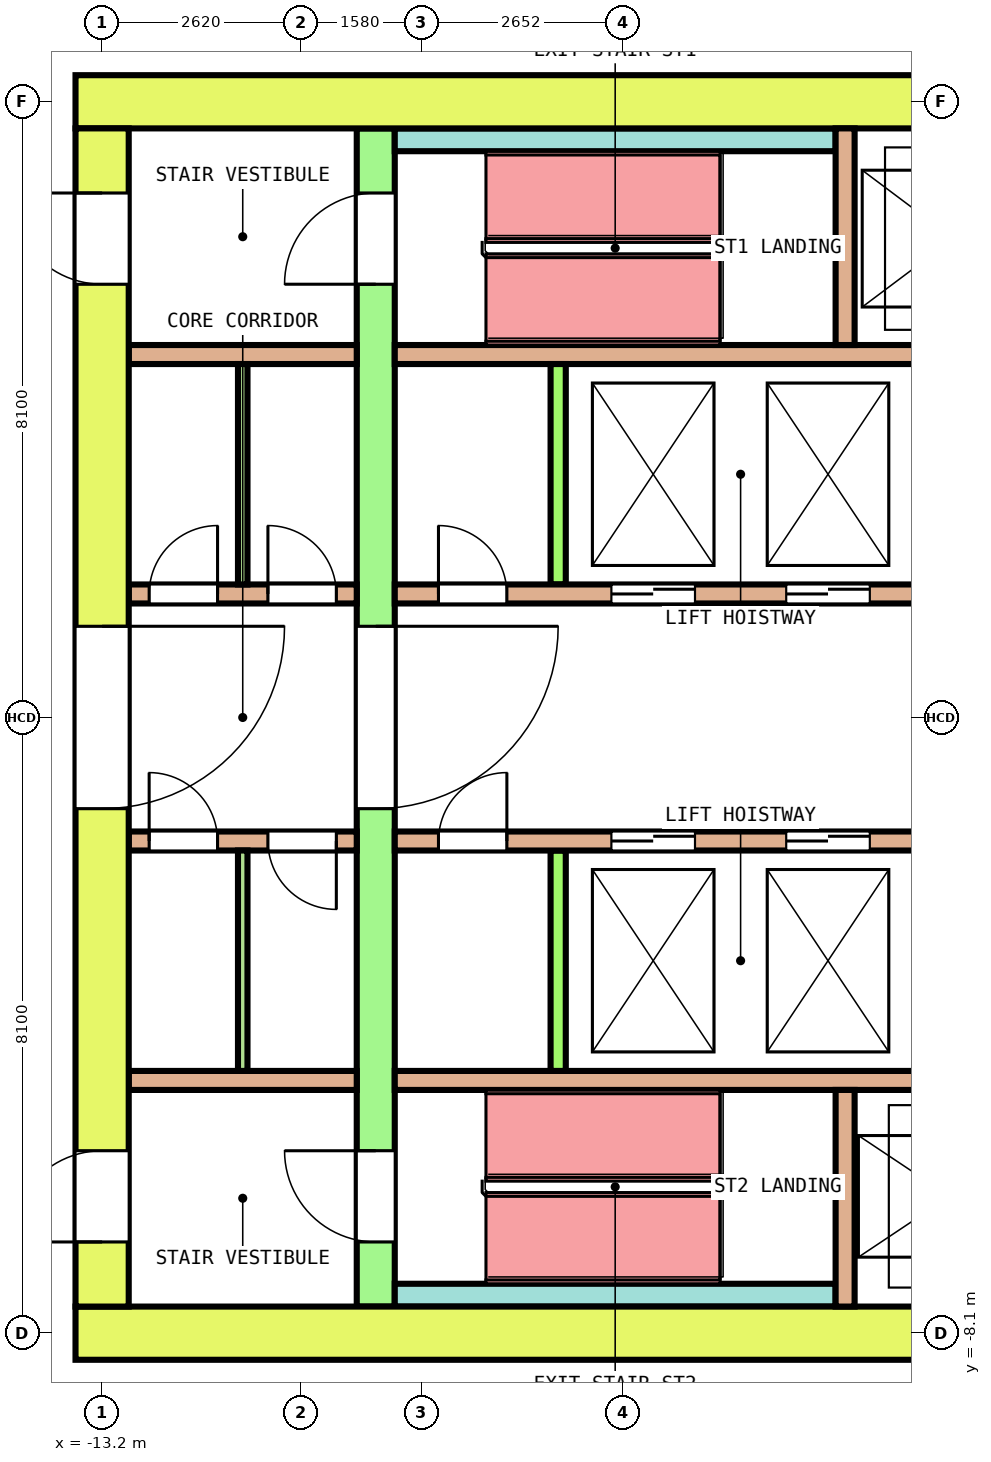
"""IFC4 building model, lengths in metres.
Left out: names, types, materials, properties, quantities, classifications, styles, units other than length and angle.
Written with IfcOpenShell. Run it as: python <this file> out.ifc"""

import sys

from ifc_helpers import new_model, si_unit, direction, frame, frame_2d, origin, place, context, subcontext, project, spatial, rectangle, extrude, element, fill, save


model = new_model("IFC4")
c1 = context("Model", 3, precision=1e-05, world=origin(), true_north=direction((0.0, 1.0)))
c2 = subcontext(c1, "Body", "Model", "MODEL_VIEW")
j1 = project(units=[si_unit("LENGTHUNIT", "METRE"), si_unit("PLANEANGLEUNIT", "RADIAN")], contexts=[c1])
p1 = place(None, origin())
s1 = spatial("IfcSite", under=j1, at=p1, CompositionType="ELEMENT")
p2 = place(p1, origin())
s2 = spatial("IfcBuilding", under=s1, at=p2, CompositionType="ELEMENT")
p3 = place(p2, frame((0.0, 0.0, 154.0)))
s3 = spatial("IfcBuildingStorey", under=s2, at=p3, CompositionType="ELEMENT", Elevation=154.0)
p4 = place(p3, frame((-13.55, 8.1, 0.0), z_axis=(0.0, 0.0, 1.0), x_axis=(1.0, 0.0, 0.0)))
e1 = element("IfcWall", 1, at=p4, inside=s3, PredefinedType="SHEAR", context=c2, shape_type="SweptSolid", body=[
    extrude(rectangle(XDim=27.1, YDim=0.7, at=frame_2d((13.55, 0.0))), origin(), (0.0, 0.0, 1.0), 4.1),
])
p5 = place(p4, frame((14.475, 0.0, 0.0)))
e2 = element("IfcOpeningElement", 2, at=p5, cuts=e1, PredefinedType="OPENING", context=c2, shape_type="SweptSolid", body=[
    extrude(rectangle(XDim=1.4, YDim=2.1, at=frame_2d((0.7, 1.05))), frame((0.0, 0.36, 0.0), z_axis=(0.0, -1.0, 0.0), x_axis=(1.0, 0.0, 0.0)), (0.0, 0.0, 1.0), 0.72),
])
p6 = place(p3, frame((-13.55, -8.1, 0.0), z_axis=(0.0, 0.0, 1.0), x_axis=(1.0, 0.0, 0.0)))
e3 = element("IfcWall", 3, at=p6, inside=s3, PredefinedType="SHEAR", context=c2, shape_type="SweptSolid", body=[
    extrude(rectangle(XDim=27.1, YDim=0.7, at=frame_2d((13.55, 0.0))), origin(), (0.0, 0.0, 1.0), 4.1),
])
p7 = place(p6, frame((15.1, 0.0, 0.0)))
e4 = element("IfcOpeningElement", 4, at=p7, cuts=e3, PredefinedType="OPENING", context=c2, shape_type="SweptSolid", body=[
    extrude(rectangle(XDim=1.2, YDim=2.1, at=frame_2d((0.6, 1.05))), frame((0.0, 0.36, 0.0), z_axis=(0.0, -1.0, 0.0), x_axis=(1.0, 0.0, 0.0)), (0.0, 0.0, 1.0), 0.72),
])
p8 = place(p3, frame((-13.2, -7.75, 0.0), z_axis=(0.0, 0.0, 1.0), x_axis=(0.0, 1.0, 0.0)))
e5 = element("IfcWall", 5, at=p8, inside=s3, PredefinedType="SHEAR", context=c2, shape_type="SweptSolid", body=[
    extrude(rectangle(XDim=15.5, YDim=0.7, at=frame_2d((7.75, 0.0))), origin(), (0.0, 0.0, 1.0), 4.1),
])
p9 = place(p8, frame((6.55, 0.0, 0.0)))
e6 = element("IfcOpeningElement", 6, at=p9, cuts=e5, PredefinedType="OPENING", context=c2, shape_type="SweptSolid", body=[
    extrude(rectangle(XDim=2.4, YDim=2.1, at=frame_2d((1.2, 1.05))), frame((0.0, 0.36, 0.0), z_axis=(0.0, -1.0, 0.0), x_axis=(1.0, 0.0, 0.0)), (0.0, 0.0, 1.0), 0.72),
])
p10 = place(p8, frame((13.45, 0.0, 0.0)))
e7 = element("IfcOpeningElement", 7, at=p10, cuts=e5, PredefinedType="OPENING", context=c2, shape_type="SweptSolid", body=[
    extrude(rectangle(XDim=1.2, YDim=2.1, at=frame_2d((0.6, 1.05))), frame((0.0, 0.36, 0.0), z_axis=(0.0, -1.0, 0.0), x_axis=(1.0, 0.0, 0.0)), (0.0, 0.0, 1.0), 0.72),
])
p11 = place(p8, frame((0.85, 0.0, 0.0)))
e8 = element("IfcOpeningElement", 8, at=p11, cuts=e5, PredefinedType="OPENING", context=c2, shape_type="SweptSolid", body=[
    extrude(rectangle(XDim=1.2, YDim=2.1, at=frame_2d((0.6, 1.05))), frame((0.0, 0.36, 0.0), z_axis=(0.0, -1.0, 0.0), x_axis=(1.0, 0.0, 0.0)), (0.0, 0.0, 1.0), 0.72),
])
p12 = place(p3, frame((-9.6, -7.75, 0.0), z_axis=(0.0, 0.0, 1.0), x_axis=(0.0, 1.0, 0.0)))
e9 = element("IfcWall", 9, at=p12, inside=s3, PredefinedType="SHEAR", context=c2, shape_type="SweptSolid", body=[
    extrude(rectangle(XDim=15.5, YDim=0.5, at=frame_2d((7.75, 0.0))), origin(), (0.0, 0.0, 1.0), 4.1),
])
p13 = place(p12, frame((6.55, 0.0, 0.0)))
e10 = element("IfcOpeningElement", 10, at=p13, cuts=e9, PredefinedType="OPENING", context=c2, shape_type="SweptSolid", body=[
    extrude(rectangle(XDim=2.4, YDim=2.1, at=frame_2d((1.2, 1.05))), frame((0.0, 0.26, 0.0), z_axis=(0.0, -1.0, 0.0), x_axis=(1.0, 0.0, 0.0)), (0.0, 0.0, 1.0), 0.52),
])
p14 = place(p12, frame((13.45, 0.0, 0.0)))
e11 = element("IfcOpeningElement", 11, at=p14, cuts=e9, PredefinedType="OPENING", context=c2, shape_type="SweptSolid", body=[
    extrude(rectangle(XDim=1.2, YDim=2.1, at=frame_2d((0.6, 1.05))), frame((0.0, 0.26, 0.0), z_axis=(0.0, -1.0, 0.0), x_axis=(1.0, 0.0, 0.0)), (0.0, 0.0, 1.0), 0.52),
])
p15 = place(p12, frame((0.85, 0.0, 0.0)))
e12 = element("IfcOpeningElement", 12, at=p15, cuts=e9, PredefinedType="OPENING", context=c2, shape_type="SweptSolid", body=[
    extrude(rectangle(XDim=1.2, YDim=2.1, at=frame_2d((0.6, 1.05))), frame((0.0, 0.26, 0.0), z_axis=(0.0, -1.0, 0.0), x_axis=(1.0, 0.0, 0.0)), (0.0, 0.0, 1.0), 0.52),
])
p16 = place(p3, frame((-12.85, 1.625, 0.0), z_axis=(0.0, 0.0, 1.0), x_axis=(1.0, 0.0, 0.0)))
e13 = element("IfcWall", 13, at=p16, inside=s3, PredefinedType="SOLIDWALL", context=c2, shape_type="SweptSolid", body=[
    extrude(rectangle(XDim=3.0, YDim=0.25, at=frame_2d((1.5, 0.0))), origin(), (0.0, 0.0, 1.0), 4.1),
])
p17 = place(p16, frame((0.269, 0.0, 0.0)))
e14 = element("IfcOpeningElement", 14, at=p17, cuts=e13, PredefinedType="OPENING", context=c2, shape_type="SweptSolid", body=[
    extrude(rectangle(XDim=0.9, YDim=2.1, at=frame_2d((0.45, 1.05))), frame((0.0, 0.135, 0.0), z_axis=(0.0, -1.0, 0.0), x_axis=(1.0, 0.0, 0.0)), (0.0, 0.0, 1.0), 0.27),
])
p18 = place(p16, frame((1.831, 0.0, 0.0)))
e15 = element("IfcOpeningElement", 15, at=p18, cuts=e13, PredefinedType="OPENING", context=c2, shape_type="SweptSolid", body=[
    extrude(rectangle(XDim=0.9, YDim=2.1, at=frame_2d((0.45, 1.05))), frame((0.0, 0.135, 0.0), z_axis=(0.0, -1.0, 0.0), x_axis=(1.0, 0.0, 0.0)), (0.0, 0.0, 1.0), 0.27),
])
p19 = place(p3, frame((-9.35, 1.625, 0.0), z_axis=(0.0, 0.0, 1.0), x_axis=(1.0, 0.0, 0.0)))
e16 = element("IfcWall", 16, at=p19, inside=s3, PredefinedType="SOLIDWALL", context=c2, shape_type="SweptSolid", body=[
    extrude(rectangle(XDim=18.7, YDim=0.25, at=frame_2d((9.35, 0.0))), origin(), (0.0, 0.0, 1.0), 4.1),
])
p20 = place(p19, frame((2.85, 0.0, 0.0)))
e17 = element("IfcOpeningElement", 17, at=p20, cuts=e16, PredefinedType="OPENING", context=c2, shape_type="SweptSolid", body=[
    extrude(rectangle(XDim=1.1, YDim=2.1, at=frame_2d((0.55, 1.05))), frame((0.0, 0.135, 0.0), z_axis=(0.0, -1.0, 0.0), x_axis=(1.0, 0.0, 0.0)), (0.0, 0.0, 1.0), 0.27),
])
p21 = place(p19, frame((5.15, 0.0, 0.0)))
e18 = element("IfcOpeningElement", 18, at=p21, cuts=e16, PredefinedType="OPENING", context=c2, shape_type="SweptSolid", body=[
    extrude(rectangle(XDim=1.1, YDim=2.1, at=frame_2d((0.55, 1.05))), frame((0.0, 0.135, 0.0), z_axis=(0.0, -1.0, 0.0), x_axis=(1.0, 0.0, 0.0)), (0.0, 0.0, 1.0), 0.27),
])
p22 = place(p19, frame((14.8, 0.0, 0.0)))
e19 = element("IfcOpeningElement", 19, at=p22, cuts=e16, PredefinedType="OPENING", context=c2, shape_type="SweptSolid", body=[
    extrude(rectangle(XDim=1.1, YDim=2.1, at=frame_2d((0.55, 1.05))), frame((0.0, 0.135, 0.0), z_axis=(0.0, -1.0, 0.0), x_axis=(1.0, 0.0, 0.0)), (0.0, 0.0, 1.0), 0.27),
])
p23 = place(p19, frame((0.575, 0.0, 0.0)))
e20 = element("IfcOpeningElement", 20, at=p23, cuts=e16, PredefinedType="OPENING", context=c2, shape_type="SweptSolid", body=[
    extrude(rectangle(XDim=0.9, YDim=2.1, at=frame_2d((0.45, 1.05))), frame((0.0, 0.135, 0.0), z_axis=(0.0, -1.0, 0.0), x_axis=(1.0, 0.0, 0.0)), (0.0, 0.0, 1.0), 0.27),
])
p24 = place(p19, frame((17.225, 0.0, 0.0)))
e21 = element("IfcOpeningElement", 21, at=p24, cuts=e16, PredefinedType="OPENING", context=c2, shape_type="SweptSolid", body=[
    extrude(rectangle(XDim=0.9, YDim=2.1, at=frame_2d((0.45, 1.05))), frame((0.0, 0.135, 0.0), z_axis=(0.0, -1.0, 0.0), x_axis=(1.0, 0.0, 0.0)), (0.0, 0.0, 1.0), 0.27),
])
p25 = place(p3, frame((-12.85, 4.775, 0.0), z_axis=(0.0, 0.0, 1.0), x_axis=(1.0, 0.0, 0.0)))
e22 = element("IfcWall", 22, at=p25, inside=s3, PredefinedType="SOLIDWALL", context=c2, shape_type="SweptSolid", body=[
    extrude(rectangle(XDim=3.0, YDim=0.25, at=frame_2d((1.5, 0.0))), origin(), (0.0, 0.0, 1.0), 4.1),
])
p26 = place(p3, frame((-9.35, 4.775, 0.0), z_axis=(0.0, 0.0, 1.0), x_axis=(1.0, 0.0, 0.0)))
e23 = element("IfcWall", 23, at=p26, inside=s3, PredefinedType="SOLIDWALL", context=c2, shape_type="SweptSolid", body=[
    extrude(rectangle(XDim=18.7, YDim=0.25, at=frame_2d((9.35, 0.0))), origin(), (0.0, 0.0, 1.0), 4.1),
])
p27 = place(p3, frame((-7.2, 1.75, 0.0), z_axis=(0.0, 0.0, 1.0), x_axis=(0.0, 1.0, 0.0)))
e24 = element("IfcWall", 24, at=p27, inside=s3, PredefinedType="SOLIDWALL", context=c2, shape_type="SweptSolid", body=[
    extrude(rectangle(XDim=2.9, YDim=0.2, at=frame_2d((1.45, 0.0))), origin(), (0.0, 0.0, 1.0), 4.1),
])
p28 = place(p3, frame((-12.85, -1.625, 0.0), z_axis=(0.0, 0.0, 1.0), x_axis=(1.0, 0.0, 0.0)))
e25 = element("IfcWall", 25, at=p28, inside=s3, PredefinedType="SOLIDWALL", context=c2, shape_type="SweptSolid", body=[
    extrude(rectangle(XDim=3.0, YDim=0.25, at=frame_2d((1.5, 0.0))), origin(), (0.0, 0.0, 1.0), 4.1),
])
p29 = place(p28, frame((0.269, 0.0, 0.0)))
e26 = element("IfcOpeningElement", 26, at=p29, cuts=e25, PredefinedType="OPENING", context=c2, shape_type="SweptSolid", body=[
    extrude(rectangle(XDim=0.9, YDim=2.1, at=frame_2d((0.45, 1.05))), frame((0.0, 0.135, 0.0), z_axis=(0.0, -1.0, 0.0), x_axis=(1.0, 0.0, 0.0)), (0.0, 0.0, 1.0), 0.27),
])
p30 = place(p28, frame((1.831, 0.0, 0.0)))
e27 = element("IfcOpeningElement", 27, at=p30, cuts=e25, PredefinedType="OPENING", context=c2, shape_type="SweptSolid", body=[
    extrude(rectangle(XDim=0.9, YDim=2.1, at=frame_2d((0.45, 1.05))), frame((0.0, 0.135, 0.0), z_axis=(0.0, -1.0, 0.0), x_axis=(1.0, 0.0, 0.0)), (0.0, 0.0, 1.0), 0.27),
])
p31 = place(p3, frame((-9.35, -1.625, 0.0), z_axis=(0.0, 0.0, 1.0), x_axis=(1.0, 0.0, 0.0)))
e28 = element("IfcWall", 28, at=p31, inside=s3, PredefinedType="SOLIDWALL", context=c2, shape_type="SweptSolid", body=[
    extrude(rectangle(XDim=18.7, YDim=0.25, at=frame_2d((9.35, 0.0))), origin(), (0.0, 0.0, 1.0), 4.1),
])
p32 = place(p31, frame((2.85, 0.0, 0.0)))
e29 = element("IfcOpeningElement", 29, at=p32, cuts=e28, PredefinedType="OPENING", context=c2, shape_type="SweptSolid", body=[
    extrude(rectangle(XDim=1.1, YDim=2.1, at=frame_2d((0.55, 1.05))), frame((0.0, 0.135, 0.0), z_axis=(0.0, -1.0, 0.0), x_axis=(1.0, 0.0, 0.0)), (0.0, 0.0, 1.0), 0.27),
])
p33 = place(p31, frame((5.15, 0.0, 0.0)))
e30 = element("IfcOpeningElement", 30, at=p33, cuts=e28, PredefinedType="OPENING", context=c2, shape_type="SweptSolid", body=[
    extrude(rectangle(XDim=1.1, YDim=2.1, at=frame_2d((0.55, 1.05))), frame((0.0, 0.135, 0.0), z_axis=(0.0, -1.0, 0.0), x_axis=(1.0, 0.0, 0.0)), (0.0, 0.0, 1.0), 0.27),
])
p34 = place(p31, frame((14.8, 0.0, 0.0)))
e31 = element("IfcOpeningElement", 31, at=p34, cuts=e28, PredefinedType="OPENING", context=c2, shape_type="SweptSolid", body=[
    extrude(rectangle(XDim=1.1, YDim=2.1, at=frame_2d((0.55, 1.05))), frame((0.0, 0.135, 0.0), z_axis=(0.0, -1.0, 0.0), x_axis=(1.0, 0.0, 0.0)), (0.0, 0.0, 1.0), 0.27),
])
p35 = place(p31, frame((0.575, 0.0, 0.0)))
e32 = element("IfcOpeningElement", 32, at=p35, cuts=e28, PredefinedType="OPENING", context=c2, shape_type="SweptSolid", body=[
    extrude(rectangle(XDim=0.9, YDim=2.1, at=frame_2d((0.45, 1.05))), frame((0.0, 0.135, 0.0), z_axis=(0.0, -1.0, 0.0), x_axis=(1.0, 0.0, 0.0)), (0.0, 0.0, 1.0), 0.27),
])
p36 = place(p31, frame((17.225, 0.0, 0.0)))
e33 = element("IfcOpeningElement", 33, at=p36, cuts=e28, PredefinedType="OPENING", context=c2, shape_type="SweptSolid", body=[
    extrude(rectangle(XDim=0.9, YDim=2.1, at=frame_2d((0.45, 1.05))), frame((0.0, 0.135, 0.0), z_axis=(0.0, -1.0, 0.0), x_axis=(1.0, 0.0, 0.0)), (0.0, 0.0, 1.0), 0.27),
])
p37 = place(p3, frame((-12.85, -4.775, 0.0), z_axis=(0.0, 0.0, 1.0), x_axis=(1.0, 0.0, 0.0)))
e34 = element("IfcWall", 34, at=p37, inside=s3, PredefinedType="SOLIDWALL", context=c2, shape_type="SweptSolid", body=[
    extrude(rectangle(XDim=3.0, YDim=0.25, at=frame_2d((1.5, 0.0))), origin(), (0.0, 0.0, 1.0), 4.1),
])
p38 = place(p3, frame((-9.35, -4.775, 0.0), z_axis=(0.0, 0.0, 1.0), x_axis=(1.0, 0.0, 0.0)))
e35 = element("IfcWall", 35, at=p38, inside=s3, PredefinedType="SOLIDWALL", context=c2, shape_type="SweptSolid", body=[
    extrude(rectangle(XDim=18.7, YDim=0.25, at=frame_2d((9.35, 0.0))), origin(), (0.0, 0.0, 1.0), 4.1),
])
p39 = place(p3, frame((-7.2, -4.65, 0.0), z_axis=(0.0, 0.0, 1.0), x_axis=(0.0, 1.0, 0.0)))
e36 = element("IfcWall", 36, at=p39, inside=s3, PredefinedType="SOLIDWALL", context=c2, shape_type="SweptSolid", body=[
    extrude(rectangle(XDim=2.9, YDim=0.2, at=frame_2d((1.45, 0.0))), origin(), (0.0, 0.0, 1.0), 4.1),
])
p40 = place(p3, frame((-9.35, 7.6, 0.0), z_axis=(0.0, 0.0, 1.0), x_axis=(1.0, 0.0, 0.0)))
e37 = element("IfcWall", 37, at=p40, inside=s3, PredefinedType="SOLIDWALL", context=c2, shape_type="SweptSolid", body=[
    extrude(rectangle(XDim=5.8, YDim=0.3, at=frame_2d((2.9, 0.0))), origin(), (0.0, 0.0, 1.0), 4.1),
])
p41 = place(p3, frame((-3.425, 4.9, 0.0), z_axis=(0.0, 0.0, 1.0), x_axis=(0.0, 1.0, 0.0)))
e38 = element("IfcWall", 38, at=p41, inside=s3, PredefinedType="SOLIDWALL", context=c2, shape_type="SweptSolid", body=[
    extrude(rectangle(XDim=2.85, YDim=0.25, at=frame_2d((1.425, 0.0))), origin(), (0.0, 0.0, 1.0), 4.1),
])
p42 = place(p3, frame((-9.35, -7.6, 0.0), z_axis=(0.0, 0.0, 1.0), x_axis=(1.0, 0.0, 0.0)))
e39 = element("IfcWall", 39, at=p42, inside=s3, PredefinedType="SOLIDWALL", context=c2, shape_type="SweptSolid", body=[
    extrude(rectangle(XDim=5.8, YDim=0.3, at=frame_2d((2.9, 0.0))), origin(), (0.0, 0.0, 1.0), 4.1),
])
p43 = place(p3, frame((-3.425, -7.75, 0.0), z_axis=(0.0, 0.0, 1.0), x_axis=(0.0, 1.0, 0.0)))
e40 = element("IfcWall", 40, at=p43, inside=s3, PredefinedType="SOLIDWALL", context=c2, shape_type="SweptSolid", body=[
    extrude(rectangle(XDim=2.85, YDim=0.25, at=frame_2d((1.425, 0.0))), origin(), (0.0, 0.0, 1.0), 4.1),
])
for number, where, z_axis, x_axis in (
    (41, (-11.35, 1.75, 0.0), (0.0, 0.0, 1.0), (0.0, 1.0, 0.0)),
    (42, (-11.35, -4.65, 0.0), (0.0, 0.0, 1.0), (0.0, 1.0, 0.0)),
):
    element("IfcWall", number, at=place(p3, frame(where, z_axis=z_axis, x_axis=x_axis)), inside=s3, PredefinedType="PARTITIONING", context=c2, shape_type="SweptSolid", body=[
        extrude(rectangle(XDim=2.9, YDim=0.125, at=frame_2d((1.45, 0.0))), origin(), (0.0, 0.0, 1.0), 4.1),
    ])
p44 = place(p20, origin())
e43 = element("IfcDoor", 43, at=p44, inside=s3, OperationType="DOUBLE_DOOR_SLIDING", PredefinedType="DOOR", context=c2, shape_type="SweptSolid", body=[
    extrude(rectangle(XDim=1.1, YDim=2.1, at=frame_2d((0.55, 1.05))), frame((0.0, 0.075, 0.0), z_axis=(0.0, -1.0, 0.0), x_axis=(1.0, 0.0, 0.0)), (0.0, 0.0, 1.0), 0.15),
])
fill(e17, e43)
p45 = place(p21, origin())
e44 = element("IfcDoor", 44, at=p45, inside=s3, OperationType="DOUBLE_DOOR_SLIDING", PredefinedType="DOOR", context=c2, shape_type="SweptSolid", body=[
    extrude(rectangle(XDim=1.1, YDim=2.1, at=frame_2d((0.55, 1.05))), frame((0.0, 0.075, 0.0), z_axis=(0.0, -1.0, 0.0), x_axis=(1.0, 0.0, 0.0)), (0.0, 0.0, 1.0), 0.15),
])
fill(e18, e44)
p46 = place(p32, origin())
e45 = element("IfcDoor", 45, at=p46, inside=s3, OperationType="DOUBLE_DOOR_SLIDING", PredefinedType="DOOR", context=c2, shape_type="SweptSolid", body=[
    extrude(rectangle(XDim=1.1, YDim=2.1, at=frame_2d((0.55, 1.05))), frame((0.0, 0.075, 0.0), z_axis=(0.0, -1.0, 0.0), x_axis=(1.0, 0.0, 0.0)), (0.0, 0.0, 1.0), 0.15),
])
fill(e29, e45)
p47 = place(p33, origin())
e46 = element("IfcDoor", 46, at=p47, inside=s3, OperationType="DOUBLE_DOOR_SLIDING", PredefinedType="DOOR", context=c2, shape_type="SweptSolid", body=[
    extrude(rectangle(XDim=1.1, YDim=2.1, at=frame_2d((0.55, 1.05))), frame((0.0, 0.075, 0.0), z_axis=(0.0, -1.0, 0.0), x_axis=(1.0, 0.0, 0.0)), (0.0, 0.0, 1.0), 0.15),
])
fill(e30, e46)
p48 = place(p13, origin())
e47 = element("IfcDoor", 47, at=p48, inside=s3, OperationType="DOUBLE_DOOR_SINGLE_SWING", PredefinedType="DOOR", context=c2, shape_type="SweptSolid", body=[
    extrude(rectangle(XDim=2.4, YDim=2.1, at=frame_2d((1.2, 1.05))), frame((0.0, 0.2, 0.0), z_axis=(0.0, -1.0, 0.0), x_axis=(1.0, 0.0, 0.0)), (0.0, 0.0, 1.0), 0.4),
])
fill(e10, e47)
p49 = place(p9, origin())
e48 = element("IfcDoor", 48, at=p49, inside=s3, OperationType="DOUBLE_DOOR_SINGLE_SWING", PredefinedType="DOOR", context=c2, shape_type="SweptSolid", body=[
    extrude(rectangle(XDim=2.4, YDim=2.1, at=frame_2d((1.2, 1.05))), frame((0.0, 0.3, 0.0), z_axis=(0.0, -1.0, 0.0), x_axis=(1.0, 0.0, 0.0)), (0.0, 0.0, 1.0), 0.6),
])
fill(e6, e48)
p50 = place(p14, origin())
e49 = element("IfcDoor", 49, at=p50, inside=s3, OperationType="SINGLE_SWING_RIGHT", PredefinedType="DOOR", context=c2, shape_type="SweptSolid", body=[
    extrude(rectangle(XDim=1.2, YDim=2.1, at=frame_2d((0.6, 1.05))), frame((0.0, 0.2, 0.0), z_axis=(0.0, -1.0, 0.0), x_axis=(1.0, 0.0, 0.0)), (0.0, 0.0, 1.0), 0.4),
])
fill(e11, e49)
p51 = place(p10, origin())
e50 = element("IfcDoor", 50, at=p51, inside=s3, OperationType="SINGLE_SWING_LEFT", PredefinedType="DOOR", context=c2, shape_type="SweptSolid", body=[
    extrude(rectangle(XDim=1.2, YDim=2.1, at=frame_2d((0.6, 1.05))), frame((0.0, 0.3, 0.0), z_axis=(0.0, -1.0, 0.0), x_axis=(1.0, 0.0, 0.0)), (0.0, 0.0, 1.0), 0.6),
])
fill(e7, e50)
p52 = place(p15, origin())
e51 = element("IfcDoor", 51, at=p52, inside=s3, OperationType="SINGLE_SWING_RIGHT", PredefinedType="DOOR", context=c2, shape_type="SweptSolid", body=[
    extrude(rectangle(XDim=1.2, YDim=2.1, at=frame_2d((0.6, 1.05))), frame((0.0, 0.2, 0.0), z_axis=(0.0, -1.0, 0.0), x_axis=(1.0, 0.0, 0.0)), (0.0, 0.0, 1.0), 0.4),
])
fill(e12, e51)
p53 = place(p11, origin())
e52 = element("IfcDoor", 52, at=p53, inside=s3, OperationType="SINGLE_SWING_LEFT", PredefinedType="DOOR", context=c2, shape_type="SweptSolid", body=[
    extrude(rectangle(XDim=1.2, YDim=2.1, at=frame_2d((0.6, 1.05))), frame((0.0, 0.3, 0.0), z_axis=(0.0, -1.0, 0.0), x_axis=(1.0, 0.0, 0.0)), (0.0, 0.0, 1.0), 0.6),
])
fill(e8, e52)
p54 = place(p17, origin())
e53 = element("IfcDoor", 53, at=p54, inside=s3, OperationType="SINGLE_SWING_LEFT", PredefinedType="DOOR", context=c2, shape_type="SweptSolid", body=[
    extrude(rectangle(XDim=0.9, YDim=2.1, at=frame_2d((0.45, 1.05))), frame((0.0, 0.075, 0.0), z_axis=(0.0, -1.0, 0.0), x_axis=(1.0, 0.0, 0.0)), (0.0, 0.0, 1.0), 0.15),
])
fill(e14, e53)
p55 = place(p18, origin())
e54 = element("IfcDoor", 54, at=p55, inside=s3, OperationType="SINGLE_SWING_RIGHT", PredefinedType="DOOR", context=c2, shape_type="SweptSolid", body=[
    extrude(rectangle(XDim=0.9, YDim=2.1, at=frame_2d((0.45, 1.05))), frame((0.0, 0.075, 0.0), z_axis=(0.0, -1.0, 0.0), x_axis=(1.0, 0.0, 0.0)), (0.0, 0.0, 1.0), 0.15),
])
fill(e15, e54)
p56 = place(p23, origin())
e55 = element("IfcDoor", 55, at=p56, inside=s3, OperationType="SINGLE_SWING_LEFT", PredefinedType="DOOR", context=c2, shape_type="SweptSolid", body=[
    extrude(rectangle(XDim=0.9, YDim=2.1, at=frame_2d((0.45, 1.05))), frame((0.0, 0.075, 0.0), z_axis=(0.0, -1.0, 0.0), x_axis=(1.0, 0.0, 0.0)), (0.0, 0.0, 1.0), 0.15),
])
fill(e20, e55)
p57 = place(p29, origin())
e56 = element("IfcDoor", 56, at=p57, inside=s3, OperationType="SINGLE_SWING_RIGHT", PredefinedType="DOOR", context=c2, shape_type="SweptSolid", body=[
    extrude(rectangle(XDim=0.9, YDim=2.1, at=frame_2d((0.45, 1.05))), frame((0.0, 0.075, 0.0), z_axis=(0.0, -1.0, 0.0), x_axis=(1.0, 0.0, 0.0)), (0.0, 0.0, 1.0), 0.15),
])
fill(e26, e56)
p58 = place(p30, origin())
e57 = element("IfcDoor", 57, at=p58, inside=s3, OperationType="SINGLE_SWING_LEFT", PredefinedType="DOOR", context=c2, shape_type="SweptSolid", body=[
    extrude(rectangle(XDim=0.9, YDim=2.1, at=frame_2d((0.45, 1.05))), frame((0.0, 0.075, 0.0), z_axis=(0.0, -1.0, 0.0), x_axis=(1.0, 0.0, 0.0)), (0.0, 0.0, 1.0), 0.15),
])
fill(e27, e57)
p59 = place(p35, origin())
e58 = element("IfcDoor", 58, at=p59, inside=s3, OperationType="SINGLE_SWING_RIGHT", PredefinedType="DOOR", context=c2, shape_type="SweptSolid", body=[
    extrude(rectangle(XDim=0.9, YDim=2.1, at=frame_2d((0.45, 1.05))), frame((0.0, 0.075, 0.0), z_axis=(0.0, -1.0, 0.0), x_axis=(1.0, 0.0, 0.0)), (0.0, 0.0, 1.0), 0.15),
])
fill(e32, e58)
save(model, sys.argv[1])
